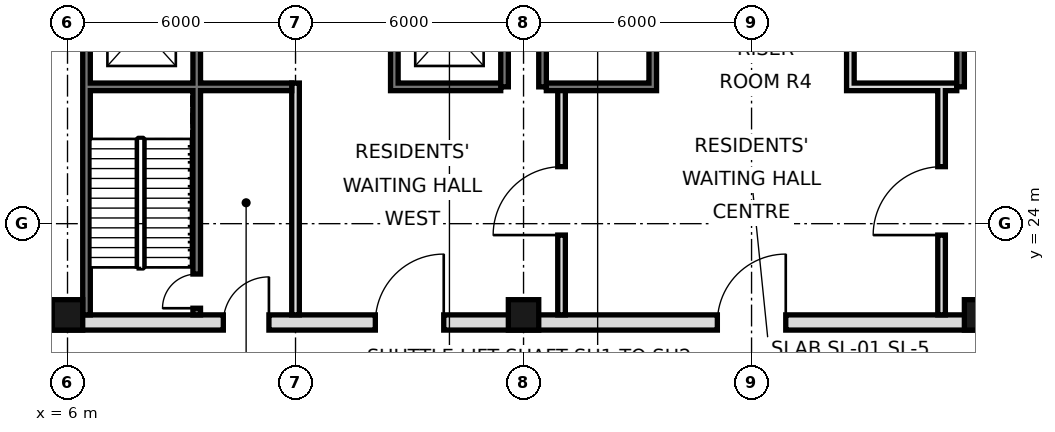
"""IFC4 building model, lengths in metres.
Left out: names, types, materials, properties, quantities, classifications, styles, units other than length and angle.
Written with IfcOpenShell. Run it as: python <this file> out.ifc"""

import sys

from ifc_helpers import new_model, si_unit, direction, frame, frame_2d, origin, origin_2d, place, context, subcontext, project, spatial, rectangle, hollow_rectangle, extrude, element, fill, save


model = new_model("IFC4")
c1 = context("Model", 3, precision=1e-05, world=origin(), true_north=direction((0.0, 1.0)))
c2 = subcontext(c1, "Body", "Model", "MODEL_VIEW")
j1 = project(units=[si_unit("LENGTHUNIT", "METRE"), si_unit("PLANEANGLEUNIT", "RADIAN")], contexts=[c1])
p1 = place(None, origin())
s1 = spatial("IfcSite", under=j1, at=p1, CompositionType="ELEMENT")
p2 = place(p1, origin())
s2 = spatial("IfcBuilding", under=s1, at=p2, CompositionType="ELEMENT")
p3 = place(p2, frame((0.0, 0.0, 20.4)))
s3 = spatial("IfcBuildingStorey", under=s2, at=p3, CompositionType="ELEMENT", Elevation=20.4)
for number, where, z_axis, x_axis in (
    (1, (6.0, 21.6, 0.0), (0.0, 0.0, 1.0), (1.0, 0.0, 0.0)),
    (2, (18.0, 21.6, 0.0), (0.0, 0.0, 1.0), (1.0, 0.0, 0.0)),
    (3, (30.0, 21.6, 0.0), (0.0, 0.0, 1.0), (1.0, 0.0, 0.0)),
):
    element("IfcColumn", number, at=place(p3, frame(where, z_axis=z_axis, x_axis=x_axis)), inside=s3, PredefinedType="COLUMN", context=c2, shape_type="SweptSolid", body=[
        extrude(hollow_rectangle(XDim=0.8, YDim=0.8, WallThickness=0.07, at=origin_2d()), origin(), (0.0, 0.0, 1.0), 4.8),
    ])
p4 = place(p3, frame((6.5, 21.6, 0.0), z_axis=(0.0, 0.0, 1.0), x_axis=(0.0, 1.0, 0.0)))
e4 = element("IfcWall", 4, at=p4, inside=s3, PredefinedType="SOLIDWALL", context=c2, shape_type="SweptSolid", body=[
    extrude(rectangle(XDim=23.5, YDim=0.2, at=frame_2d((11.75, 0.0))), origin(), (0.0, 0.0, 1.0), 4.4),
])
for number, where, z_axis, x_axis in (
    (5, (17.5, 27.6, 0.0), (0.0, 0.0, 1.0), (0.0, 1.0, 0.0)),
    (6, (18.5, 27.6, 0.0), (0.0, 0.0, 1.0), (0.0, 1.0, 0.0)),
    (7, (29.5, 27.6, 0.0), (0.0, 0.0, 1.0), (0.0, 1.0, 0.0)),
):
    element("IfcWall", number, at=place(p3, frame(where, z_axis=z_axis, x_axis=x_axis)), inside=s3, PredefinedType="SOLIDWALL", context=c2, shape_type="SweptSolid", body=[
        extrude(rectangle(XDim=17.5, YDim=0.2, at=frame_2d((8.75, 0.0))), origin(), (0.0, 0.0, 1.0), 4.4),
    ])
p5 = place(p3, frame((5.6, 21.4, 0.0), z_axis=(0.0, 0.0, 1.0), x_axis=(1.0, 0.0, 0.0)))
e8 = element("IfcWall", 8, at=p5, inside=s3, PredefinedType="SOLIDWALL", context=c2, shape_type="SweptSolid", body=[
    extrude(rectangle(XDim=36.8, YDim=0.4, at=frame_2d((18.4, 0.0))), origin(), (0.0, 0.0, 1.0), 4.4),
])
p6 = place(p5, frame((8.5, 0.0, 0.0)))
e9 = element("IfcOpeningElement", 9, at=p6, cuts=e8, PredefinedType="OPENING", context=c2, shape_type="SweptSolid", body=[
    extrude(rectangle(XDim=1.8, YDim=2.1, at=frame_2d((0.9, 1.05))), frame((0.0, 0.21, 0.0), z_axis=(0.0, -1.0, 0.0), x_axis=(1.0, 0.0, 0.0)), (0.0, 0.0, 1.0), 0.42),
])
p7 = place(p5, frame((17.5, 0.0, 0.0)))
e10 = element("IfcOpeningElement", 10, at=p7, cuts=e8, PredefinedType="OPENING", context=c2, shape_type="SweptSolid", body=[
    extrude(rectangle(XDim=1.8, YDim=2.1, at=frame_2d((0.9, 1.05))), frame((0.0, 0.21, 0.0), z_axis=(0.0, -1.0, 0.0), x_axis=(1.0, 0.0, 0.0)), (0.0, 0.0, 1.0), 0.42),
])
p8 = place(p5, frame((26.5, 0.0, 0.0)))
e11 = element("IfcOpeningElement", 11, at=p8, cuts=e8, PredefinedType="OPENING", context=c2, shape_type="SweptSolid", body=[
    extrude(rectangle(XDim=1.8, YDim=2.1, at=frame_2d((0.9, 1.05))), frame((0.0, 0.21, 0.0), z_axis=(0.0, -1.0, 0.0), x_axis=(1.0, 0.0, 0.0)), (0.0, 0.0, 1.0), 0.42),
])
p9 = place(p5, frame((4.5, 0.0, 0.0)))
e12 = element("IfcOpeningElement", 12, at=p9, cuts=e8, PredefinedType="OPENING", context=c2, shape_type="SweptSolid", body=[
    extrude(rectangle(XDim=1.2, YDim=2.1, at=frame_2d((0.6, 1.05))), frame((0.0, 0.21, 0.0), z_axis=(0.0, -1.0, 0.0), x_axis=(1.0, 0.0, 0.0)), (0.0, 0.0, 1.0), 0.42),
])
p10 = place(p5, frame((31.1, 0.0, 0.0)))
e13 = element("IfcOpeningElement", 13, at=p10, cuts=e8, PredefinedType="OPENING", context=c2, shape_type="SweptSolid", body=[
    extrude(rectangle(XDim=1.2, YDim=2.1, at=frame_2d((0.6, 1.05))), frame((0.0, 0.21, 0.0), z_axis=(0.0, -1.0, 0.0), x_axis=(1.0, 0.0, 0.0)), (0.0, 0.0, 1.0), 0.42),
])
p11 = place(p3, frame((19.0, 21.6, 0.0), z_axis=(0.0, 0.0, 1.0), x_axis=(0.0, 1.0, 0.0)))
e14 = element("IfcWall", 14, at=p11, inside=s3, PredefinedType="PARTITIONING", context=c2, shape_type="SweptSolid", body=[
    extrude(rectangle(XDim=6.0, YDim=0.2, at=frame_2d((3.0, 0.0))), origin(), (0.0, 0.0, 1.0), 4.4),
])
p12 = place(p11, frame((2.1, 0.0, 0.0)))
e15 = element("IfcOpeningElement", 15, at=p12, cuts=e14, PredefinedType="OPENING", context=c2, shape_type="SweptSolid", body=[
    extrude(rectangle(XDim=1.8, YDim=2.1, at=frame_2d((0.9, 1.05))), frame((0.0, 0.11, 0.0), z_axis=(0.0, -1.0, 0.0), x_axis=(1.0, 0.0, 0.0)), (0.0, 0.0, 1.0), 0.22),
])
p13 = place(p3, frame((29.0, 21.6, 0.0), z_axis=(0.0, 0.0, 1.0), x_axis=(0.0, 1.0, 0.0)))
e16 = element("IfcWall", 16, at=p13, inside=s3, PredefinedType="PARTITIONING", context=c2, shape_type="SweptSolid", body=[
    extrude(rectangle(XDim=6.0, YDim=0.2, at=frame_2d((3.0, 0.0))), origin(), (0.0, 0.0, 1.0), 4.4),
])
p14 = place(p13, frame((2.1, 0.0, 0.0)))
e17 = element("IfcOpeningElement", 17, at=p14, cuts=e16, PredefinedType="OPENING", context=c2, shape_type="SweptSolid", body=[
    extrude(rectangle(XDim=1.8, YDim=2.1, at=frame_2d((0.9, 1.05))), frame((0.0, 0.11, 0.0), z_axis=(0.0, -1.0, 0.0), x_axis=(1.0, 0.0, 0.0)), (0.0, 0.0, 1.0), 0.22),
])
p15 = place(p3, frame((12.0, 21.6, 0.0), z_axis=(0.0, 0.0, 1.0), x_axis=(0.0, 1.0, 0.0)))
e18 = element("IfcWall", 18, at=p15, inside=s3, PredefinedType="PARTITIONING", context=c2, shape_type="SweptSolid", body=[
    extrude(rectangle(XDim=6.1, YDim=0.2, at=frame_2d((3.05, 0.0))), origin(), (0.0, 0.0, 1.0), 4.4),
])
p16 = place(p3, frame((14.6, 27.5, 0.0), z_axis=(0.0, 0.0, 1.0), x_axis=(0.0, 1.0, 0.0)))
e19 = element("IfcWall", 19, at=p16, inside=s3, PredefinedType="SOLIDWALL", context=c2, shape_type="SweptSolid", body=[
    extrude(rectangle(XDim=17.5, YDim=0.2, at=frame_2d((8.75, 0.0))), origin(), (0.0, 0.0, 1.0), 4.4),
])
p17 = place(p16, frame((1.1, 0.0, 0.0)))
e20 = element("IfcOpeningElement", 20, at=p17, cuts=e19, PredefinedType="OPENING", context=c2, shape_type="SweptSolid", body=[
    extrude(rectangle(XDim=1.1, YDim=2.1, at=frame_2d((0.55, 1.05))), frame((0.0, 0.11, 0.0), z_axis=(0.0, -1.0, 0.0), x_axis=(1.0, 0.0, 0.0)), (0.0, 0.0, 1.0), 0.22),
])
p18 = place(p16, frame((4.2, 0.0, 0.0)))
e21 = element("IfcOpeningElement", 21, at=p18, cuts=e19, PredefinedType="OPENING", context=c2, shape_type="SweptSolid", body=[
    extrude(rectangle(XDim=1.1, YDim=2.1, at=frame_2d((0.55, 1.05))), frame((0.0, 0.11, 0.0), z_axis=(0.0, -1.0, 0.0), x_axis=(1.0, 0.0, 0.0)), (0.0, 0.0, 1.0), 0.22),
])
p19 = place(p16, frame((15.4, 0.0, 0.0)))
e22 = element("IfcOpeningElement", 22, at=p19, cuts=e19, PredefinedType="OPENING", context=c2, shape_type="SweptSolid", body=[
    extrude(rectangle(XDim=1.1, YDim=2.1, at=frame_2d((0.55, 1.05))), frame((0.0, 0.11, 0.0), z_axis=(0.0, -1.0, 0.0), x_axis=(1.0, 0.0, 0.0)), (0.0, 0.0, 1.0), 0.22),
])
p20 = place(p16, frame((9.9, 0.0, 0.0)))
e23 = element("IfcOpeningElement", 23, at=p20, cuts=e19, PredefinedType="OPENING", context=c2, shape_type="SweptSolid", body=[
    extrude(rectangle(XDim=0.9, YDim=2.1, at=frame_2d((0.45, 1.05))), frame((0.0, 0.11, 0.0), z_axis=(0.0, -1.0, 0.0), x_axis=(1.0, 0.0, 0.0)), (0.0, 0.0, 1.0), 0.22),
])
p21 = place(p3, frame((21.4, 27.5, 0.0), z_axis=(0.0, 0.0, 1.0), x_axis=(0.0, 1.0, 0.0)))
e24 = element("IfcWall", 24, at=p21, inside=s3, PredefinedType="SOLIDWALL", context=c2, shape_type="SweptSolid", body=[
    extrude(rectangle(XDim=17.5, YDim=0.2, at=frame_2d((8.75, 0.0))), origin(), (0.0, 0.0, 1.0), 4.4),
])
p22 = place(p21, frame((16.2, 0.0, 0.0)))
e25 = element("IfcOpeningElement", 25, at=p22, cuts=e24, PredefinedType="OPENING", context=c2, shape_type="SweptSolid", body=[
    extrude(rectangle(XDim=1.0, YDim=2.1, at=frame_2d((0.5, 1.05))), frame((0.0, 0.11, 0.0), z_axis=(0.0, -1.0, 0.0), x_axis=(1.0, 0.0, 0.0)), (0.0, 0.0, 1.0), 0.22),
])
p23 = place(p21, frame((7.4, 0.0, 0.0)))
e26 = element("IfcOpeningElement", 26, at=p23, cuts=e24, PredefinedType="OPENING", context=c2, shape_type="SweptSolid", body=[
    extrude(rectangle(XDim=0.9, YDim=2.1, at=frame_2d((0.45, 1.05))), frame((0.0, 0.11, 0.0), z_axis=(0.0, -1.0, 0.0), x_axis=(1.0, 0.0, 0.0)), (0.0, 0.0, 1.0), 0.22),
])
p24 = place(p3, frame((26.6, 27.5, 0.0), z_axis=(0.0, 0.0, 1.0), x_axis=(0.0, 1.0, 0.0)))
e27 = element("IfcWall", 27, at=p24, inside=s3, PredefinedType="SOLIDWALL", context=c2, shape_type="SweptSolid", body=[
    extrude(rectangle(XDim=17.5, YDim=0.2, at=frame_2d((8.75, 0.0))), origin(), (0.0, 0.0, 1.0), 4.4),
])
p25 = place(p24, frame((4.3, 0.0, 0.0)))
e28 = element("IfcOpeningElement", 28, at=p25, cuts=e27, PredefinedType="OPENING", context=c2, shape_type="SweptSolid", body=[
    extrude(rectangle(XDim=0.9, YDim=2.1, at=frame_2d((0.45, 1.05))), frame((0.0, 0.11, 0.0), z_axis=(0.0, -1.0, 0.0), x_axis=(1.0, 0.0, 0.0)), (0.0, 0.0, 1.0), 0.22),
])
p26 = place(p24, frame((10.35, 0.0, 0.0)))
e29 = element("IfcOpeningElement", 29, at=p26, cuts=e27, PredefinedType="OPENING", context=c2, shape_type="SweptSolid", body=[
    extrude(rectangle(XDim=1.0, YDim=2.1, at=frame_2d((0.5, 1.05))), frame((0.0, 0.11, 0.0), z_axis=(0.0, -1.0, 0.0), x_axis=(1.0, 0.0, 0.0)), (0.0, 0.0, 1.0), 0.22),
])
p27 = place(p24, frame((15.475, 0.0, 0.0)))
e30 = element("IfcOpeningElement", 30, at=p27, cuts=e27, PredefinedType="OPENING", context=c2, shape_type="SweptSolid", body=[
    extrude(rectangle(XDim=1.0, YDim=2.1, at=frame_2d((0.5, 1.05))), frame((0.0, 0.11, 0.0), z_axis=(0.0, -1.0, 0.0), x_axis=(1.0, 0.0, 0.0)), (0.0, 0.0, 1.0), 0.22),
])
p28 = place(p3, frame((9.4, 21.6, 0.0), z_axis=(0.0, 0.0, 1.0), x_axis=(0.0, 1.0, 0.0)))
e31 = element("IfcWall", 31, at=p28, inside=s3, PredefinedType="SOLIDWALL", context=c2, shape_type="SweptSolid", body=[
    extrude(rectangle(XDim=23.4, YDim=0.2, at=frame_2d((11.7, 0.0))), origin(), (0.0, 0.0, 1.0), 4.4),
])
p29 = place(p28, frame((7.0, 0.0, 0.0)))
e32 = element("IfcOpeningElement", 32, at=p29, cuts=e31, PredefinedType="OPENING", context=c2, shape_type="SweptSolid", body=[
    extrude(rectangle(XDim=1.1, YDim=2.1, at=frame_2d((0.55, 1.05))), frame((0.0, 0.11, 0.0), z_axis=(0.0, -1.0, 0.0), x_axis=(1.0, 0.0, 0.0)), (0.0, 0.0, 1.0), 0.22),
])
p30 = place(p28, frame((10.1, 0.0, 0.0)))
e33 = element("IfcOpeningElement", 33, at=p30, cuts=e31, PredefinedType="OPENING", context=c2, shape_type="SweptSolid", body=[
    extrude(rectangle(XDim=1.1, YDim=2.1, at=frame_2d((0.55, 1.05))), frame((0.0, 0.11, 0.0), z_axis=(0.0, -1.0, 0.0), x_axis=(1.0, 0.0, 0.0)), (0.0, 0.0, 1.0), 0.22),
])
p31 = place(p28, frame((13.2, 0.0, 0.0)))
e34 = element("IfcOpeningElement", 34, at=p31, cuts=e31, PredefinedType="OPENING", context=c2, shape_type="SweptSolid", body=[
    extrude(rectangle(XDim=1.1, YDim=2.1, at=frame_2d((0.55, 1.05))), frame((0.0, 0.11, 0.0), z_axis=(0.0, -1.0, 0.0), x_axis=(1.0, 0.0, 0.0)), (0.0, 0.0, 1.0), 0.22),
])
p32 = place(p28, frame((22.1, 0.0, 0.0)))
e35 = element("IfcOpeningElement", 35, at=p32, cuts=e31, PredefinedType="OPENING", context=c2, shape_type="SweptSolid", body=[
    extrude(rectangle(XDim=1.0, YDim=2.1, at=frame_2d((0.5, 1.05))), frame((0.0, 0.11, 0.0), z_axis=(0.0, -1.0, 0.0), x_axis=(1.0, 0.0, 0.0)), (0.0, 0.0, 1.0), 0.22),
])
p33 = place(p28, frame((0.175, 0.0, 0.0)))
e36 = element("IfcOpeningElement", 36, at=p33, cuts=e31, PredefinedType="OPENING", context=c2, shape_type="SweptSolid", body=[
    extrude(rectangle(XDim=0.9, YDim=2.1, at=frame_2d((0.45, 1.05))), frame((0.0, 0.11, 0.0), z_axis=(0.0, -1.0, 0.0), x_axis=(1.0, 0.0, 0.0)), (0.0, 0.0, 1.0), 0.22),
])
for number, where, z_axis, x_axis in (
    (37, (14.7, 27.6, 0.0), (0.0, 0.0, 1.0), (1.0, 0.0, 0.0)),
    (38, (18.6, 27.6, 0.0), (0.0, 0.0, 1.0), (1.0, 0.0, 0.0)),
    (39, (26.7, 27.6, 0.0), (0.0, 0.0, 1.0), (1.0, 0.0, 0.0)),
):
    element("IfcWall", number, at=place(p3, frame(where, z_axis=z_axis, x_axis=x_axis)), inside=s3, PredefinedType="SOLIDWALL", context=c2, shape_type="SweptSolid", body=[
        extrude(rectangle(XDim=2.7, YDim=0.2, at=frame_2d((1.35, 0.0))), origin(), (0.0, 0.0, 1.0), 4.4),
    ])
p34 = place(p3, frame((6.6, 27.6, 0.0), z_axis=(0.0, 0.0, 1.0), x_axis=(1.0, 0.0, 0.0)))
e40 = element("IfcWall", 40, at=p34, inside=s3, PredefinedType="SOLIDWALL", context=c2, shape_type="SweptSolid", body=[
    extrude(rectangle(XDim=5.3, YDim=0.2, at=frame_2d((2.65, 0.0))), origin(), (0.0, 0.0, 1.0), 4.4),
])
p35 = place(p6, frame((1.8, 0.0, 0.0), z_axis=(0.0, 0.0, 1.0), x_axis=(-1.0, 0.0, 0.0)))
e41 = element("IfcDoor", 41, at=p35, inside=s3, OperationType="SINGLE_SWING_LEFT", PredefinedType="DOOR", context=c2, shape_type="SweptSolid", body=[
    extrude(rectangle(XDim=1.8, YDim=2.1, at=frame_2d((0.9, 1.05))), frame((0.0, 0.025, 0.0), z_axis=(0.0, -1.0, 0.0), x_axis=(1.0, 0.0, 0.0)), (0.0, 0.0, 1.0), 0.05),
])
fill(e9, e41)
p36 = place(p12, origin())
e42 = element("IfcDoor", 42, at=p36, inside=s3, OperationType="SINGLE_SWING_LEFT", PredefinedType="DOOR", context=c2, shape_type="SweptSolid", body=[
    extrude(rectangle(XDim=1.8, YDim=2.1, at=frame_2d((0.9, 1.05))), frame((0.0, 0.025, 0.0), z_axis=(0.0, -1.0, 0.0), x_axis=(1.0, 0.0, 0.0)), (0.0, 0.0, 1.0), 0.05),
])
fill(e15, e42)
p37 = place(p7, frame((1.8, 0.0, 0.0), z_axis=(0.0, 0.0, 1.0), x_axis=(-1.0, 0.0, 0.0)))
e43 = element("IfcDoor", 43, at=p37, inside=s3, OperationType="SINGLE_SWING_LEFT", PredefinedType="DOOR", context=c2, shape_type="SweptSolid", body=[
    extrude(rectangle(XDim=1.8, YDim=2.1, at=frame_2d((0.9, 1.05))), frame((0.0, 0.025, 0.0), z_axis=(0.0, -1.0, 0.0), x_axis=(1.0, 0.0, 0.0)), (0.0, 0.0, 1.0), 0.05),
])
fill(e10, e43)
p38 = place(p14, origin())
e44 = element("IfcDoor", 44, at=p38, inside=s3, OperationType="SINGLE_SWING_LEFT", PredefinedType="DOOR", context=c2, shape_type="SweptSolid", body=[
    extrude(rectangle(XDim=1.8, YDim=2.1, at=frame_2d((0.9, 1.05))), frame((0.0, 0.025, 0.0), z_axis=(0.0, -1.0, 0.0), x_axis=(1.0, 0.0, 0.0)), (0.0, 0.0, 1.0), 0.05),
])
fill(e17, e44)
p39 = place(p9, frame((1.2, 0.0, 0.0), z_axis=(0.0, 0.0, 1.0), x_axis=(-1.0, 0.0, 0.0)))
e45 = element("IfcDoor", 45, at=p39, inside=s3, OperationType="SINGLE_SWING_LEFT", PredefinedType="DOOR", context=c2, shape_type="SweptSolid", body=[
    extrude(rectangle(XDim=1.2, YDim=2.1, at=frame_2d((0.6, 1.05))), frame((0.0, 0.025, 0.0), z_axis=(0.0, -1.0, 0.0), x_axis=(1.0, 0.0, 0.0)), (0.0, 0.0, 1.0), 0.05),
])
fill(e12, e45)
p40 = place(p33, origin())
e46 = element("IfcDoor", 46, at=p40, inside=s3, OperationType="SINGLE_SWING_LEFT", PredefinedType="DOOR", context=c2, shape_type="SweptSolid", body=[
    extrude(rectangle(XDim=0.9, YDim=2.1, at=frame_2d((0.45, 1.05))), frame((0.0, 0.025, 0.0), z_axis=(0.0, -1.0, 0.0), x_axis=(1.0, 0.0, 0.0)), (0.0, 0.0, 1.0), 0.05),
])
fill(e36, e46)
save(model, sys.argv[1])
